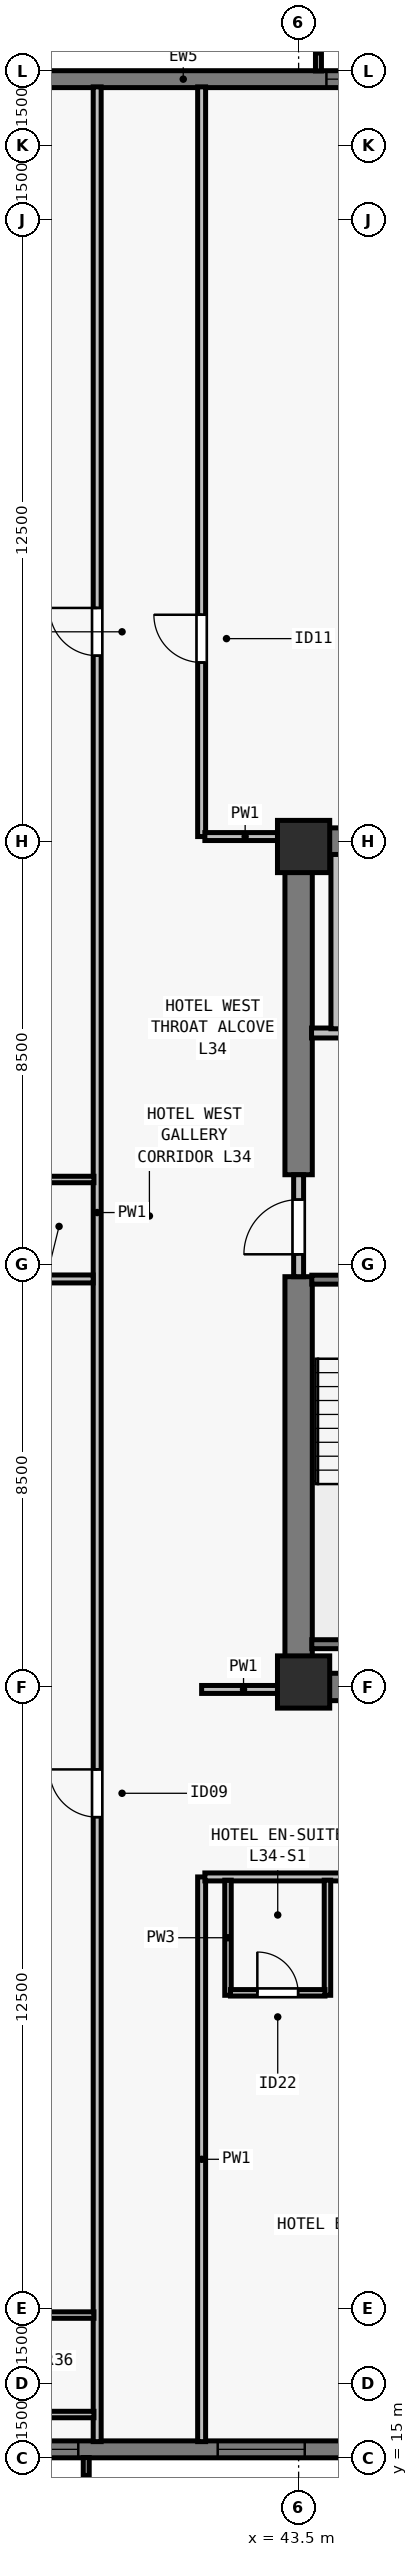
"""IFC4 building model, lengths in metres.
Left out: names, types, materials, properties, quantities, classifications, styles, units other than length and angle.
Written with IfcOpenShell. Run it as: python <this file> out.ifc"""

import sys

from ifc_helpers import new_model, si_unit, direction, frame, frame_2d, origin, origin_2d, place, context, subcontext, project, spatial, rectangle, extrude, element, fill, save


model = new_model("IFC4")
c1 = context("Model", 3, precision=1e-05, world=origin(), true_north=direction((0.0, 1.0)))
c2 = subcontext(c1, "Body", "Model", "MODEL_VIEW")
j1 = project(units=[si_unit("LENGTHUNIT", "METRE"), si_unit("PLANEANGLEUNIT", "RADIAN")], contexts=[c1])
p1 = place(None, origin())
s1 = spatial("IfcSite", under=j1, at=p1, CompositionType="ELEMENT")
p2 = place(p1, origin())
s2 = spatial("IfcBuilding", under=s1, at=p2, CompositionType="ELEMENT")
p3 = place(p2, frame((0.0, 0.0, 127.0)))
s3 = spatial("IfcBuildingStorey", under=s2, at=p3, CompositionType="ELEMENT", Elevation=127.0)
for number, where, z_axis, x_axis in (
    (1, (43.6, 30.6, 0.0), (0.0, 0.0, 1.0), (1.0, 0.0, 0.0)),
    (2, (43.6, 47.4, 0.0), (0.0, 0.0, 1.0), (1.0, 0.0, 0.0)),
):
    element("IfcColumn", number, at=place(p3, frame(where, z_axis=z_axis, x_axis=x_axis)), inside=s3, PredefinedType="COLUMN", context=c2, shape_type="SweptSolid", body=[
        extrude(rectangle(XDim=1.05, YDim=1.05, at=origin_2d()), origin(), (0.0, 0.0, 1.0), 3.5),
    ])
p4 = place(p3, frame((32.0, 62.83, 0.0), z_axis=(0.0, 0.0, 1.0), x_axis=(1.0, 0.0, 0.0)))
e3 = element("IfcWall", 3, at=p4, inside=s3, PredefinedType="SOLIDWALL", context=c2, shape_type="SweptSolid", body=[
    extrude(rectangle(XDim=39.682, YDim=0.34, at=frame_2d((19.841, 0.0))), origin(), (0.0, 0.0, 1.0), 3.28),
])
p5 = place(p4, frame((4.952, 0.0, 0.8)))
e4 = element("IfcOpeningElement", 4, at=p5, cuts=e3, PredefinedType="OPENING", context=c2, shape_type="SweptSolid", body=[
    extrude(rectangle(XDim=1.35, YDim=1.66, at=frame_2d((0.675, 0.83))), frame((0.0, 0.18, 0.0), z_axis=(0.0, -1.0, 0.0), x_axis=(1.0, 0.0, 0.0)), (0.0, 0.0, 1.0), 0.36),
])
p6 = place(p4, frame((12.059, 0.0, 0.8)))
e5 = element("IfcOpeningElement", 5, at=p6, cuts=e3, PredefinedType="OPENING", context=c2, shape_type="SweptSolid", body=[
    extrude(rectangle(XDim=1.35, YDim=1.66, at=frame_2d((0.675, 0.83))), frame((0.0, 0.18, 0.0), z_axis=(0.0, -1.0, 0.0), x_axis=(1.0, 0.0, 0.0)), (0.0, 0.0, 1.0), 0.36),
])
p7 = place(p4, frame((16.262, 0.0, 0.8)))
e6 = element("IfcOpeningElement", 6, at=p7, cuts=e3, PredefinedType="OPENING", context=c2, shape_type="SweptSolid", body=[
    extrude(rectangle(XDim=1.75, YDim=1.66, at=frame_2d((0.875, 0.83))), frame((0.0, 0.18, 0.0), z_axis=(0.0, -1.0, 0.0), x_axis=(1.0, 0.0, 0.0)), (0.0, 0.0, 1.0), 0.36),
])
p8 = place(p4, frame((19.166, 0.0, 0.8)))
e7 = element("IfcOpeningElement", 7, at=p8, cuts=e3, PredefinedType="OPENING", context=c2, shape_type="SweptSolid", body=[
    extrude(rectangle(XDim=1.35, YDim=1.66, at=frame_2d((0.675, 0.83))), frame((0.0, 0.18, 0.0), z_axis=(0.0, -1.0, 0.0), x_axis=(1.0, 0.0, 0.0)), (0.0, 0.0, 1.0), 0.36),
])
p9 = place(p4, frame((22.07, 0.0, 0.8)))
e8 = element("IfcOpeningElement", 8, at=p9, cuts=e3, PredefinedType="OPENING", context=c2, shape_type="SweptSolid", body=[
    extrude(rectangle(XDim=1.75, YDim=1.66, at=frame_2d((0.875, 0.83))), frame((0.0, 0.18, 0.0), z_axis=(0.0, -1.0, 0.0), x_axis=(1.0, 0.0, 0.0)), (0.0, 0.0, 1.0), 0.36),
])
p10 = place(p4, frame((26.273, 0.0, 0.8)))
e9 = element("IfcOpeningElement", 9, at=p10, cuts=e3, PredefinedType="OPENING", context=c2, shape_type="SweptSolid", body=[
    extrude(rectangle(XDim=1.35, YDim=1.66, at=frame_2d((0.675, 0.83))), frame((0.0, 0.18, 0.0), z_axis=(0.0, -1.0, 0.0), x_axis=(1.0, 0.0, 0.0)), (0.0, 0.0, 1.0), 0.36),
])
p11 = place(p4, frame((29.627, 0.0, 0.8)))
e10 = element("IfcOpeningElement", 10, at=p11, cuts=e3, PredefinedType="OPENING", context=c2, shape_type="SweptSolid", body=[
    extrude(rectangle(XDim=1.75, YDim=1.66, at=frame_2d((0.875, 0.83))), frame((0.0, 0.18, 0.0), z_axis=(0.0, -1.0, 0.0), x_axis=(1.0, 0.0, 0.0)), (0.0, 0.0, 1.0), 0.36),
])
p12 = place(p4, frame((34.23, 0.0, 0.8)))
e11 = element("IfcOpeningElement", 11, at=p12, cuts=e3, PredefinedType="OPENING", context=c2, shape_type="SweptSolid", body=[
    extrude(rectangle(XDim=1.35, YDim=1.66, at=frame_2d((0.675, 0.83))), frame((0.0, 0.18, 0.0), z_axis=(0.0, -1.0, 0.0), x_axis=(1.0, 0.0, 0.0)), (0.0, 0.0, 1.0), 0.36),
])
p13 = place(p3, frame((72.0, 15.17, 0.0), z_axis=(0.0, 0.0, 1.0), x_axis=(-1.0, 0.0, 0.0)))
e12 = element("IfcWall", 12, at=p13, inside=s3, PredefinedType="SOLIDWALL", context=c2, shape_type="SweptSolid", body=[
    extrude(rectangle(XDim=39.682, YDim=0.34, at=frame_2d((19.841, 0.0))), origin(), (0.0, 0.0, 1.0), 3.28),
])
p14 = place(p13, frame((8.755, 0.0, 0.8)))
e13 = element("IfcOpeningElement", 13, at=p14, cuts=e12, PredefinedType="OPENING", context=c2, shape_type="SweptSolid", body=[
    extrude(rectangle(XDim=1.75, YDim=1.66, at=frame_2d((0.875, 0.83))), frame((0.0, 0.18, 0.0), z_axis=(0.0, -1.0, 0.0), x_axis=(1.0, 0.0, 0.0)), (0.0, 0.0, 1.0), 0.36),
])
p15 = place(p13, frame((12.059, 0.0, 0.8)))
e14 = element("IfcOpeningElement", 14, at=p15, cuts=e12, PredefinedType="OPENING", context=c2, shape_type="SweptSolid", body=[
    extrude(rectangle(XDim=1.35, YDim=1.66, at=frame_2d((0.675, 0.83))), frame((0.0, 0.18, 0.0), z_axis=(0.0, -1.0, 0.0), x_axis=(1.0, 0.0, 0.0)), (0.0, 0.0, 1.0), 0.36),
])
p16 = place(p13, frame((16.262, 0.0, 0.8)))
e15 = element("IfcOpeningElement", 15, at=p16, cuts=e12, PredefinedType="OPENING", context=c2, shape_type="SweptSolid", body=[
    extrude(rectangle(XDim=1.75, YDim=1.66, at=frame_2d((0.875, 0.83))), frame((0.0, 0.18, 0.0), z_axis=(0.0, -1.0, 0.0), x_axis=(1.0, 0.0, 0.0)), (0.0, 0.0, 1.0), 0.36),
])
p17 = place(p13, frame((19.166, 0.0, 0.8)))
e16 = element("IfcOpeningElement", 16, at=p17, cuts=e12, PredefinedType="OPENING", context=c2, shape_type="SweptSolid", body=[
    extrude(rectangle(XDim=1.35, YDim=1.66, at=frame_2d((0.675, 0.83))), frame((0.0, 0.18, 0.0), z_axis=(0.0, -1.0, 0.0), x_axis=(1.0, 0.0, 0.0)), (0.0, 0.0, 1.0), 0.36),
])
p18 = place(p13, frame((21.27, 0.0, 0.8)))
e17 = element("IfcOpeningElement", 17, at=p18, cuts=e12, PredefinedType="OPENING", context=c2, shape_type="SweptSolid", body=[
    extrude(rectangle(XDim=1.75, YDim=1.66, at=frame_2d((0.875, 0.83))), frame((0.0, 0.18, 0.0), z_axis=(0.0, -1.0, 0.0), x_axis=(1.0, 0.0, 0.0)), (0.0, 0.0, 1.0), 0.36),
])
p19 = place(p13, frame((26.273, 0.0, 0.8)))
e18 = element("IfcOpeningElement", 18, at=p19, cuts=e12, PredefinedType="OPENING", context=c2, shape_type="SweptSolid", body=[
    extrude(rectangle(XDim=1.35, YDim=1.66, at=frame_2d((0.675, 0.83))), frame((0.0, 0.18, 0.0), z_axis=(0.0, -1.0, 0.0), x_axis=(1.0, 0.0, 0.0)), (0.0, 0.0, 1.0), 0.36),
])
p20 = place(p13, frame((28.377, 0.0, 0.8)))
e19 = element("IfcOpeningElement", 19, at=p20, cuts=e12, PredefinedType="OPENING", context=c2, shape_type="SweptSolid", body=[
    extrude(rectangle(XDim=1.75, YDim=1.66, at=frame_2d((0.875, 0.83))), frame((0.0, 0.18, 0.0), z_axis=(0.0, -1.0, 0.0), x_axis=(1.0, 0.0, 0.0)), (0.0, 0.0, 1.0), 0.36),
])
p21 = place(p13, frame((32.93, 0.0, 0.8)))
e20 = element("IfcOpeningElement", 20, at=p21, cuts=e12, PredefinedType="OPENING", context=c2, shape_type="SweptSolid", body=[
    extrude(rectangle(XDim=1.35, YDim=1.66, at=frame_2d((0.675, 0.83))), frame((0.0, 0.18, 0.0), z_axis=(0.0, -1.0, 0.0), x_axis=(1.0, 0.0, 0.0)), (0.0, 0.0, 1.0), 0.36),
])
for number, where, z_axis, x_axis in (
    (21, (43.225, 30.5, 0.0), (0.0, 0.0, 1.0), (1.0, 0.0, 0.0)),
    (22, (43.225, 47.5, 0.0), (0.0, 0.0, 1.0), (1.0, 0.0, 0.0)),
):
    element("IfcWall", number, at=place(p3, frame(where, z_axis=z_axis, x_axis=x_axis)), inside=s3, PredefinedType="SHEAR", context=c2, shape_type="SweptSolid", body=[
        extrude(rectangle(XDim=17.55, YDim=0.55, at=frame_2d((8.775, 0.0))), origin(), (0.0, 0.0, 1.0), 3.28),
    ])
p22 = place(p3, frame((43.5, 30.765, 0.0), z_axis=(0.0, 0.0, 1.0), x_axis=(0.0, 1.0, 0.0)))
e23 = element("IfcWall", 23, at=p22, inside=s3, PredefinedType="SHEAR", context=c2, shape_type="SweptSolid", body=[
    extrude(rectangle(XDim=7.985, YDim=0.55, at=frame_2d((3.993, 0.0))), origin(), (0.0, 0.0, 1.0), 3.28),
])
p23 = place(p3, frame((43.5, 40.8, 0.0), z_axis=(0.0, 0.0, 1.0), x_axis=(0.0, 1.0, 0.0)))
e24 = element("IfcWall", 24, at=p23, inside=s3, PredefinedType="SHEAR", context=c2, shape_type="SweptSolid", body=[
    extrude(rectangle(XDim=6.435, YDim=0.55, at=frame_2d((3.218, 0.0))), origin(), (0.0, 0.0, 1.0), 3.28),
])
p24 = place(p3, frame((43.5, 38.75, 0.0), z_axis=(0.0, 0.0, 1.0), x_axis=(0.0, 1.0, 0.0)))
e25 = element("IfcWall", 25, at=p24, inside=s3, PredefinedType="SOLIDWALL", context=c2, shape_type="SweptSolid", body=[
    extrude(rectangle(XDim=2.05, YDim=0.2, at=frame_2d((1.025, 0.0))), origin(), (0.0, 0.0, 1.0), 3.28),
])
p25 = place(p24, frame((0.45, 0.0, 0.0)))
e26 = element("IfcOpeningElement", 26, at=p25, cuts=e25, PredefinedType="OPENING", context=c2, shape_type="SweptSolid", body=[
    extrude(rectangle(XDim=1.1, YDim=2.15, at=frame_2d((0.55, 1.075))), frame((0.0, 0.11, 0.0), z_axis=(0.0, -1.0, 0.0), x_axis=(1.0, 0.0, 0.0)), (0.0, 0.0, 1.0), 0.22),
])
p26 = place(p3, frame((43.76, 43.65, 0.0), z_axis=(0.0, 0.0, 1.0), x_axis=(1.0, 0.0, 0.0)))
e27 = element("IfcWall", 27, at=p26, inside=s3, PredefinedType="SOLIDWALL", context=c2, shape_type="SweptSolid", body=[
    extrude(rectangle(XDim=3.505, YDim=0.2, at=frame_2d((1.752, 0.0))), origin(), (0.0, 0.0, 1.0), 3.28),
])
p27 = place(p26, frame((1.11, 0.0, 0.0)))
e28 = element("IfcOpeningElement", 28, at=p27, cuts=e27, PredefinedType="OPENING", context=c2, shape_type="SweptSolid", body=[
    extrude(rectangle(XDim=1.1, YDim=2.2, at=frame_2d((0.55, 1.1))), frame((0.0, 0.11, 0.0), z_axis=(0.0, -1.0, 0.0), x_axis=(1.0, 0.0, 0.0)), (0.0, 0.0, 1.0), 0.22),
])
p28 = place(p3, frame((44.25, 43.735, 0.0), z_axis=(0.0, 0.0, 1.0), x_axis=(0.0, 1.0, 0.0)))
e29 = element("IfcWall", 29, at=p28, inside=s3, PredefinedType="SOLIDWALL", context=c2, shape_type="SweptSolid", body=[
    extrude(rectangle(XDim=3.505, YDim=0.2, at=frame_2d((1.752, 0.0))), origin(), (0.0, 0.0, 1.0), 3.28),
])
p29 = place(p3, frame((39.45, 15.325, 0.0), z_axis=(0.0, 0.0, 1.0), x_axis=(0.0, 1.0, 0.0)))
e30 = element("IfcWall", 30, at=p29, inside=s3, PredefinedType="PARTITIONING", context=c2, shape_type="SweptSolid", body=[
    extrude(rectangle(XDim=47.35, YDim=0.16, at=frame_2d((23.675, 0.0))), origin(), (0.0, 0.0, 1.0), 2.555),
])
p30 = place(p29, frame((12.557, 0.0, 0.0)))
e31 = element("IfcOpeningElement", 31, at=p30, cuts=e30, PredefinedType="OPENING", context=c2, shape_type="SweptSolid", body=[
    extrude(rectangle(XDim=0.96, YDim=2.15, at=frame_2d((0.48, 1.075))), frame((0.0, 0.09, 0.0), z_axis=(0.0, -1.0, 0.0), x_axis=(1.0, 0.0, 0.0)), (0.0, 0.0, 1.0), 0.18),
])
p31 = place(p29, frame((35.912, 0.0, 0.0)))
e32 = element("IfcOpeningElement", 32, at=p31, cuts=e30, PredefinedType="OPENING", context=c2, shape_type="SweptSolid", body=[
    extrude(rectangle(XDim=0.96, YDim=2.15, at=frame_2d((0.48, 1.075))), frame((0.0, 0.09, 0.0), z_axis=(0.0, -1.0, 0.0), x_axis=(1.0, 0.0, 0.0)), (0.0, 0.0, 1.0), 0.18),
])
p32 = place(p3, frame((41.55, 15.325, 0.0), z_axis=(0.0, 0.0, 1.0), x_axis=(0.0, 1.0, 0.0)))
e33 = element("IfcWall", 33, at=p32, inside=s3, PredefinedType="PARTITIONING", context=c2, shape_type="SweptSolid", body=[
    extrude(rectangle(XDim=11.355, YDim=0.16, at=frame_2d((5.677, 0.0))), origin(), (0.0, 0.0, 1.0), 3.28),
])
p33 = place(p3, frame((41.55, 47.6, 0.0), z_axis=(0.0, 0.0, 1.0), x_axis=(0.0, 1.0, 0.0)))
e34 = element("IfcWall", 34, at=p33, inside=s3, PredefinedType="PARTITIONING", context=c2, shape_type="SweptSolid", body=[
    extrude(rectangle(XDim=15.075, YDim=0.16, at=frame_2d((7.538, 0.0))), origin(), (0.0, 0.0, 1.0), 2.555),
])
p34 = place(p33, frame((3.5, 0.0, 0.0)))
e35 = element("IfcOpeningElement", 35, at=p34, cuts=e34, PredefinedType="OPENING", context=c2, shape_type="SweptSolid", body=[
    extrude(rectangle(XDim=0.96, YDim=2.12, at=frame_2d((0.48, 1.06))), frame((0.0, 0.09, 0.0), z_axis=(0.0, -1.0, 0.0), x_axis=(1.0, 0.0, 0.0)), (0.0, 0.0, 1.0), 0.18),
])
p35 = place(p3, frame((41.55, 30.45, 0.0), z_axis=(0.0, 0.0, 1.0), x_axis=(1.0, 0.0, 0.0)))
e36 = element("IfcWall", 36, at=p35, inside=s3, PredefinedType="PARTITIONING", context=c2, shape_type="SweptSolid", body=[
    extrude(rectangle(XDim=1.685, YDim=0.16, at=frame_2d((0.843, 0.0))), origin(), (0.0, 0.0, 1.0), 3.28),
])
p36 = place(p3, frame((41.615, 47.6, 0.0), z_axis=(0.0, 0.0, 1.0), x_axis=(1.0, 0.0, 0.0)))
e37 = element("IfcWall", 37, at=p36, inside=s3, PredefinedType="PARTITIONING", context=c2, shape_type="SweptSolid", body=[
    extrude(rectangle(XDim=1.62, YDim=0.16, at=frame_2d((0.81, 0.0))), origin(), (0.0, 0.0, 1.0), 3.28),
])
p37 = place(p3, frame((41.615, 26.68, 0.0), z_axis=(0.0, 0.0, 1.0), x_axis=(1.0, 0.0, 0.0)))
e38 = element("IfcWall", 38, at=p37, inside=s3, PredefinedType="PARTITIONING", context=c2, shape_type="SweptSolid", body=[
    extrude(rectangle(XDim=22.07, YDim=0.16, at=frame_2d((11.035, 0.0))), origin(), (0.0, 0.0, 1.0), 3.28),
])
p38 = place(p37, frame((4.281, 0.0, 0.0)))
e39 = element("IfcOpeningElement", 39, at=p38, cuts=e38, PredefinedType="OPENING", context=c2, shape_type="SweptSolid", body=[
    extrude(rectangle(XDim=0.96, YDim=2.15, at=frame_2d((0.48, 1.075))), frame((0.0, 0.09, 0.0), z_axis=(0.0, -1.0, 0.0), x_axis=(1.0, 0.0, 0.0)), (0.0, 0.0, 1.0), 0.18),
])
p39 = place(p37, frame((11.56, 0.0, 0.0)))
e40 = element("IfcOpeningElement", 40, at=p39, cuts=e38, PredefinedType="OPENING", context=c2, shape_type="SweptSolid", body=[
    extrude(rectangle(XDim=0.96, YDim=2.15, at=frame_2d((0.48, 1.075))), frame((0.0, 0.09, 0.0), z_axis=(0.0, -1.0, 0.0), x_axis=(1.0, 0.0, 0.0)), (0.0, 0.0, 1.0), 0.18),
])
p40 = place(p37, frame((19.134, 0.0, 0.0)))
e41 = element("IfcOpeningElement", 41, at=p40, cuts=e38, PredefinedType="OPENING", context=c2, shape_type="SweptSolid", body=[
    extrude(rectangle(XDim=0.96, YDim=2.15, at=frame_2d((0.48, 1.075))), frame((0.0, 0.09, 0.0), z_axis=(0.0, -1.0, 0.0), x_axis=(1.0, 0.0, 0.0)), (0.0, 0.0, 1.0), 0.18),
])
for number, where, z_axis, x_axis in (
    (42, (42.08, 24.3, 0.0), (0.0, 0.0, 1.0), (0.0, 1.0, 0.0)),
    (43, (44.08, 24.3, 0.0), (0.0, 0.0, 1.0), (0.0, 1.0, 0.0)),
):
    element("IfcWall", number, at=place(p3, frame(where, z_axis=z_axis, x_axis=x_axis)), inside=s3, PredefinedType="PLUMBINGWALL", context=c2, shape_type="SweptSolid", body=[
        extrude(rectangle(XDim=2.315, YDim=0.13, at=frame_2d((1.157, 0.0))), origin(), (0.0, 0.0, 1.0), 3.28),
    ])
p41 = place(p3, frame((42.13, 24.35, 0.0), z_axis=(0.0, 0.0, 1.0), x_axis=(1.0, 0.0, 0.0)))
e44 = element("IfcWall", 44, at=p41, inside=s3, PredefinedType="PLUMBINGWALL", context=c2, shape_type="SweptSolid", body=[
    extrude(rectangle(XDim=1.9, YDim=0.13, at=frame_2d((0.95, 0.0))), origin(), (0.0, 0.0, 1.0), 3.28),
])
p42 = place(p41, frame((0.54, 0.0, 0.0)))
e45 = element("IfcOpeningElement", 45, at=p42, cuts=e44, PredefinedType="OPENING", context=c2, shape_type="SweptSolid", body=[
    extrude(rectangle(XDim=0.82, YDim=2.1, at=frame_2d((0.41, 1.05))), frame((0.0, 0.075, 0.0), z_axis=(0.0, -1.0, 0.0), x_axis=(1.0, 0.0, 0.0)), (0.0, 0.0, 1.0), 0.15),
])
for number, where, z_axis, x_axis in (
    (46, (37.07, 15.87, 0.0), (0.0, 0.0, 1.0), (1.0, 0.0, 0.0)),
    (47, (37.07, 17.87, 0.0), (0.0, 0.0, 1.0), (1.0, 0.0, 0.0)),
):
    element("IfcWall", number, at=place(p3, frame(where, z_axis=z_axis, x_axis=x_axis)), inside=s3, PredefinedType="PLUMBINGWALL", context=c2, shape_type="SweptSolid", body=[
        extrude(rectangle(XDim=2.315, YDim=0.13, at=frame_2d((1.157, 0.0))), origin(), (0.0, 0.0, 1.0), 3.28),
    ])
p43 = place(p3, frame((28.27, 38.704, 0.0), z_axis=(0.0, 0.0, 1.0), x_axis=(1.0, 0.0, 0.0)))
e48 = element("IfcWall", 48, at=p43, inside=s3, PredefinedType="PARTITIONING", context=c2, shape_type="SweptSolid", body=[
    extrude(rectangle(XDim=11.1, YDim=0.16, at=frame_2d((5.55, 0.0))), origin(), (0.0, 0.0, 1.0), 2.896),
])
p44 = place(p3, frame((37.07, 40.704, 0.0), z_axis=(0.0, 0.0, 1.0), x_axis=(1.0, 0.0, 0.0)))
e49 = element("IfcWall", 49, at=p44, inside=s3, PredefinedType="PLUMBINGWALL", context=c2, shape_type="SweptSolid", body=[
    extrude(rectangle(XDim=2.315, YDim=0.13, at=frame_2d((1.157, 0.0))), origin(), (0.0, 0.0, 1.0), 3.28),
])
p45 = place(p3, frame((43.765, 38.69, 0.0), z_axis=(0.0, 0.0, 1.0), x_axis=(1.0, 0.0, 0.0)))
e50 = element("IfcWall", 50, at=p45, inside=s3, PredefinedType="SOLIDWALL", context=c2, shape_type="SweptSolid", body=[
    extrude(rectangle(XDim=3.23, YDim=0.18, at=frame_2d((1.615, 0.0))), origin(), (0.0, 0.0, 1.0), 3.28),
])
p46 = place(p45, frame((1.14, 0.0, 0.0)))
e51 = element("IfcOpeningElement", 51, at=p46, cuts=e50, PredefinedType="OPENING", context=c2, shape_type="SweptSolid", body=[
    extrude(rectangle(XDim=0.95, YDim=2.15, at=frame_2d((0.475, 1.075))), frame((0.0, 0.1, 0.0), z_axis=(0.0, -1.0, 0.0), x_axis=(1.0, 0.0, 0.0)), (0.0, 0.0, 1.0), 0.2),
])
p47 = place(p3, frame((43.765, 31.36, 0.0), z_axis=(0.0, 0.0, 1.0), x_axis=(1.0, 0.0, 0.0)))
e52 = element("IfcWall", 52, at=p47, inside=s3, PredefinedType="SOLIDWALL", context=c2, shape_type="SweptSolid", body=[
    extrude(rectangle(XDim=3.23, YDim=0.18, at=frame_2d((1.615, 0.0))), origin(), (0.0, 0.0, 1.0), 3.28),
])
p48 = place(p6, origin())
e53 = element("IfcWindow", 53, at=p48, inside=s3, PartitioningType="SINGLE_PANEL", PredefinedType="WINDOW", context=c2, shape_type="SweptSolid", body=[
    extrude(rectangle(XDim=1.35, YDim=1.66, at=frame_2d((0.675, 0.83))), frame((0.0, -0.05, 0.0), z_axis=(0.0, -1.0, 0.0), x_axis=(1.0, 0.0, 0.0)), (0.0, 0.0, 1.0), 0.06),
])
fill(e5, e53)
p49 = place(p20, origin())
e54 = element("IfcWindow", 54, at=p49, inside=s3, PartitioningType="SINGLE_PANEL", PredefinedType="WINDOW", context=c2, shape_type="SweptSolid", body=[
    extrude(rectangle(XDim=1.75, YDim=1.66, at=frame_2d((0.875, 0.83))), frame((0.0, -0.05, 0.0), z_axis=(0.0, -1.0, 0.0), x_axis=(1.0, 0.0, 0.0)), (0.0, 0.0, 1.0), 0.06),
])
fill(e19, e54)
p50 = place(p21, origin())
e55 = element("IfcWindow", 55, at=p50, inside=s3, PartitioningType="SINGLE_PANEL", PredefinedType="WINDOW", context=c2, shape_type="SweptSolid", body=[
    extrude(rectangle(XDim=1.35, YDim=1.66, at=frame_2d((0.675, 0.83))), frame((0.0, -0.05, 0.0), z_axis=(0.0, -1.0, 0.0), x_axis=(1.0, 0.0, 0.0)), (0.0, 0.0, 1.0), 0.06),
])
fill(e20, e55)
p51 = place(p25, origin())
e56 = element("IfcDoor", 56, at=p51, inside=s3, OperationType="SINGLE_SWING_LEFT", PredefinedType="DOOR", context=c2, shape_type="SweptSolid", body=[
    extrude(rectangle(XDim=1.1, YDim=2.15, at=frame_2d((0.55, 1.075))), frame((0.0, 0.025, 0.0), z_axis=(0.0, -1.0, 0.0), x_axis=(1.0, 0.0, 0.0)), (0.0, 0.0, 1.0), 0.05),
])
fill(e26, e56)
p52 = place(p34, origin())
e57 = element("IfcDoor", 57, at=p52, inside=s3, OperationType="SINGLE_SWING_RIGHT", PredefinedType="DOOR", context=c2, shape_type="SweptSolid", body=[
    extrude(rectangle(XDim=0.96, YDim=2.12, at=frame_2d((0.48, 1.06))), frame((0.0, 0.025, 0.0), z_axis=(0.0, -1.0, 0.0), x_axis=(1.0, 0.0, 0.0)), (0.0, 0.0, 1.0), 0.05),
])
fill(e35, e57)
p53 = place(p42, origin())
e58 = element("IfcDoor", 58, at=p53, inside=s3, OperationType="SINGLE_SWING_LEFT", PredefinedType="DOOR", context=c2, shape_type="SweptSolid", body=[
    extrude(rectangle(XDim=0.82, YDim=2.1, at=frame_2d((0.41, 1.05))), frame((0.0, 0.025, 0.0), z_axis=(0.0, -1.0, 0.0), x_axis=(1.0, 0.0, 0.0)), (0.0, 0.0, 1.0), 0.05),
])
fill(e45, e58)
p54 = place(p30, origin())
e59 = element("IfcDoor", 59, at=p54, inside=s3, OperationType="SINGLE_SWING_RIGHT", PredefinedType="DOOR", context=c2, shape_type="SweptSolid", body=[
    extrude(rectangle(XDim=0.96, YDim=2.15, at=frame_2d((0.48, 1.075))), frame((0.0, 0.025, 0.0), z_axis=(0.0, -1.0, 0.0), x_axis=(1.0, 0.0, 0.0)), (0.0, 0.0, 1.0), 0.05),
])
fill(e31, e59)
p55 = place(p31, origin())
e60 = element("IfcDoor", 60, at=p55, inside=s3, OperationType="SINGLE_SWING_RIGHT", PredefinedType="DOOR", context=c2, shape_type="SweptSolid", body=[
    extrude(rectangle(XDim=0.96, YDim=2.15, at=frame_2d((0.48, 1.075))), frame((0.0, 0.025, 0.0), z_axis=(0.0, -1.0, 0.0), x_axis=(1.0, 0.0, 0.0)), (0.0, 0.0, 1.0), 0.05),
])
fill(e32, e60)
save(model, sys.argv[1])
